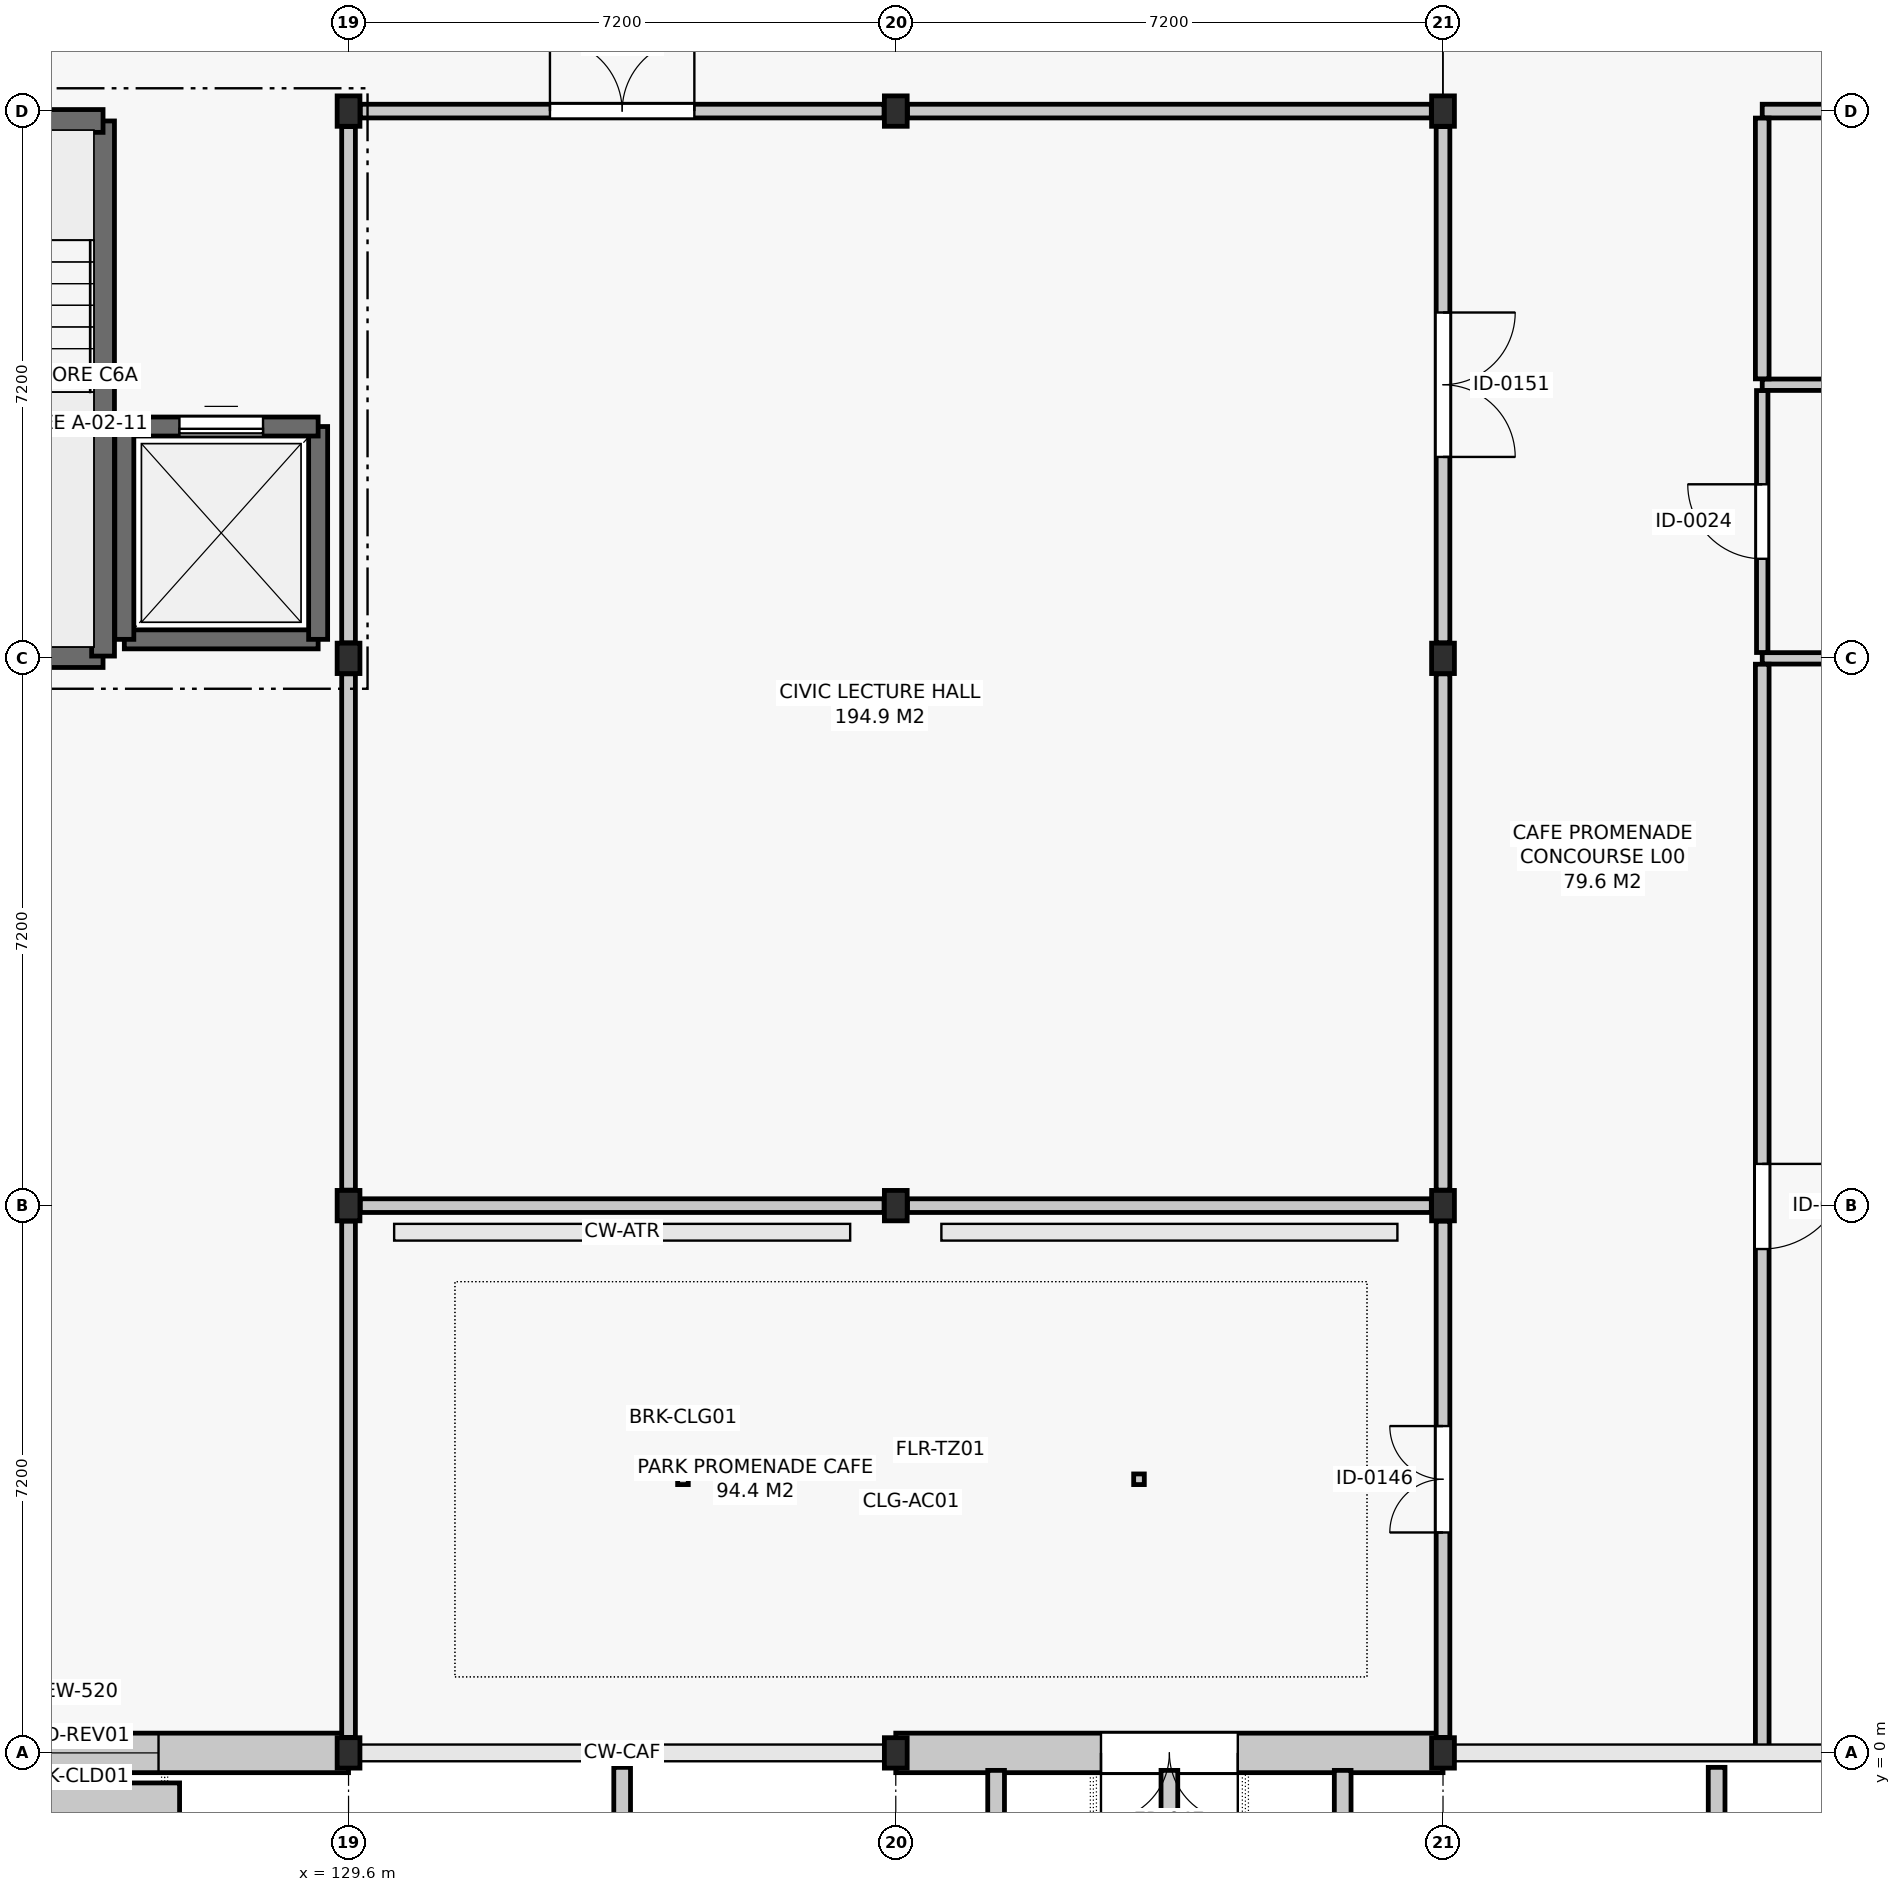
"""IFC4 building model, lengths in metres.
Left out: names, types, materials, properties, quantities, classifications, styles, units other than length and angle.
Written with IfcOpenShell. Run it as: python <this file> out.ifc"""

import sys

from ifc_helpers import new_model, si_unit, direction, frame, frame_2d, origin, origin_2d, place, context, subcontext, project, spatial, rectangle, i_section, extrude, element, fill, save


model = new_model("IFC4")
c1 = context("Model", 3, precision=1e-05, world=origin(), true_north=direction((0.0, 1.0)))
c2 = subcontext(c1, "Body", "Model", "MODEL_VIEW")
j1 = project(units=[si_unit("LENGTHUNIT", "METRE"), si_unit("PLANEANGLEUNIT", "RADIAN")], contexts=[c1])
p1 = place(None, origin())
s1 = spatial("IfcSite", under=j1, at=p1, CompositionType="ELEMENT")
p2 = place(p1, origin())
s2 = spatial("IfcBuilding", under=s1, at=p2, CompositionType="ELEMENT")
p3 = place(p2, origin())
s3 = spatial("IfcBuildingStorey", under=s2, at=p3, CompositionType="ELEMENT", Elevation=0.0)
for number, where, z_axis, x_axis in (
    (1, (129.6, 0.0, 0.0), (0.0, 0.0, 1.0), (1.0, 0.0, 0.0)),
    (2, (129.6, 7.2, 0.0), (0.0, 0.0, 1.0), (1.0, 0.0, 0.0)),
    (3, (129.6, 14.4, 0.0), (0.0, 0.0, 1.0), (1.0, 0.0, 0.0)),
    (4, (129.6, 21.6, 0.0), (0.0, 0.0, 1.0), (1.0, 0.0, 0.0)),
    (5, (136.8, 0.0, 0.0), (0.0, 0.0, 1.0), (1.0, 0.0, 0.0)),
    (6, (136.8, 7.2, 0.0), (0.0, 0.0, 1.0), (1.0, 0.0, 0.0)),
    (7, (136.8, 21.6, 0.0), (0.0, 0.0, 1.0), (1.0, 0.0, 0.0)),
    (8, (144.0, 0.0, 0.0), (0.0, 0.0, 1.0), (1.0, 0.0, 0.0)),
    (9, (144.0, 7.2, 0.0), (0.0, 0.0, 1.0), (1.0, 0.0, 0.0)),
    (10, (144.0, 14.4, 0.0), (0.0, 0.0, 1.0), (1.0, 0.0, 0.0)),
    (11, (144.0, 21.6, 0.0), (0.0, 0.0, 1.0), (1.0, 0.0, 0.0)),
):
    element("IfcColumn", number, at=place(p3, frame(where, z_axis=z_axis, x_axis=x_axis)), inside=s3, PredefinedType="COLUMN", context=c2, shape_type="SweptSolid", body=[
        extrude(i_section(OverallWidth=0.3, OverallDepth=0.4, WebThickness=0.013, FlangeThickness=0.024, FilletRadius=0.027, at=origin_2d()), origin(), (0.0, 0.0, 1.0), 5.4),
    ])
p4 = place(p3, frame((122.554, 0.0, 0.0), z_axis=(0.0, 0.0, 1.0), x_axis=(1.0, 0.0, 0.0)))
e12 = element("IfcWall", 12, at=p4, inside=s3, PredefinedType="SOLIDWALL", context=c2, shape_type="SweptSolid", body=[
    extrude(rectangle(XDim=7.046, YDim=0.52, at=frame_2d((3.523, 0.0))), origin(), (0.0, 0.0, 1.0), 4.4),
])
p5 = place(p4, frame((2.346, 0.0, 0.9)))
e13 = element("IfcOpeningElement", 13, at=p5, cuts=e12, PredefinedType="OPENING", context=c2, shape_type="SweptSolid", body=[
    extrude(rectangle(XDim=2.2, YDim=2.25, at=frame_2d((1.1, 1.125))), frame((0.0, 0.272, 0.0), z_axis=(0.0, -1.0, 0.0), x_axis=(1.0, 0.0, 0.0)), (0.0, 0.0, 1.0), 0.544),
])
p6 = place(p3, frame((136.8, 0.0, 0.0), z_axis=(0.0, 0.0, 1.0), x_axis=(1.0, 0.0, 0.0)))
e14 = element("IfcWall", 14, at=p6, inside=s3, PredefinedType="SOLIDWALL", context=c2, shape_type="SweptSolid", body=[
    extrude(rectangle(XDim=7.2, YDim=0.52, at=frame_2d((3.6, 0.0))), origin(), (0.0, 0.0, 1.0), 4.4),
])
p7 = place(p6, frame((2.7, 0.0, 0.0)))
e15 = element("IfcOpeningElement", 15, at=p7, cuts=e14, PredefinedType="OPENING", context=c2, shape_type="SweptSolid", body=[
    extrude(rectangle(XDim=1.8, YDim=2.4, at=frame_2d((0.9, 1.2))), frame((0.0, 0.272, 0.0), z_axis=(0.0, -1.0, 0.0), x_axis=(1.0, 0.0, 0.0)), (0.0, 0.0, 1.0), 0.544),
])
p8 = place(p3, frame((122.93, 14.43, 0.0), z_axis=(0.0, 0.0, 1.0), x_axis=(1.0, 0.0, 0.0)))
e16 = element("IfcWall", 16, at=p8, inside=s3, PredefinedType="SHEAR", context=c2, shape_type="SweptSolid", body=[
    extrude(rectangle(XDim=3.44, YDim=0.3, at=frame_2d((1.72, 0.0))), origin(), (0.0, 0.0, 1.0), 5.12),
])
p9 = place(p3, frame((126.37, 14.43, 0.0), z_axis=(0.0, 0.0, 1.0), x_axis=(0.0, 1.0, 0.0)))
e17 = element("IfcWall", 17, at=p9, inside=s3, PredefinedType="SHEAR", context=c2, shape_type="SweptSolid", body=[
    extrude(rectangle(XDim=7.04, YDim=0.3, at=frame_2d((3.52, 0.0))), origin(), (0.0, 0.0, 1.0), 5.12),
])
p10 = place(p3, frame((126.37, 21.47, 0.0), z_axis=(0.0, 0.0, 1.0), x_axis=(-1.0, 0.0, 0.0)))
e18 = element("IfcWall", 18, at=p10, inside=s3, PredefinedType="SHEAR", context=c2, shape_type="SweptSolid", body=[
    extrude(rectangle(XDim=3.44, YDim=0.3, at=frame_2d((1.72, 0.0))), origin(), (0.0, 0.0, 1.0), 5.12),
])
p11 = place(p10, frame((1.17, 0.0, 0.0)))
e19 = element("IfcOpeningElement", 19, at=p11, cuts=e18, PredefinedType="OPENING", context=c2, shape_type="SweptSolid", body=[
    extrude(rectangle(XDim=1.1, YDim=2.15, at=frame_2d((0.55, 1.075))), frame((0.0, 0.162, 0.0), z_axis=(0.0, -1.0, 0.0), x_axis=(1.0, 0.0, 0.0)), (0.0, 0.0, 1.0), 0.324),
])
p12 = place(p3, frame((126.65, 14.65, 0.0), z_axis=(0.0, 0.0, 1.0), x_axis=(1.0, 0.0, 0.0)))
e20 = element("IfcWall", 20, at=p12, inside=s3, PredefinedType="SHEAR", context=c2, shape_type="SweptSolid", body=[
    extrude(rectangle(XDim=2.55, YDim=0.25, at=frame_2d((1.275, 0.0))), origin(), (0.0, 0.0, 1.0), 5.12),
])
p13 = place(p3, frame((129.2, 14.65, 0.0), z_axis=(0.0, 0.0, 1.0), x_axis=(0.0, 1.0, 0.0)))
e21 = element("IfcWall", 21, at=p13, inside=s3, PredefinedType="SHEAR", context=c2, shape_type="SweptSolid", body=[
    extrude(rectangle(XDim=2.8, YDim=0.25, at=frame_2d((1.4, 0.0))), origin(), (0.0, 0.0, 1.0), 5.12),
])
p14 = place(p3, frame((129.2, 17.45, 0.0), z_axis=(0.0, 0.0, 1.0), x_axis=(-1.0, 0.0, 0.0)))
e22 = element("IfcWall", 22, at=p14, inside=s3, PredefinedType="SHEAR", context=c2, shape_type="SweptSolid", body=[
    extrude(rectangle(XDim=2.55, YDim=0.25, at=frame_2d((1.275, 0.0))), origin(), (0.0, 0.0, 1.0), 5.12),
])
p15 = place(p14, frame((0.725, 0.0, 0.0)))
e23 = element("IfcOpeningElement", 23, at=p15, cuts=e22, PredefinedType="OPENING", context=c2, shape_type="SweptSolid", body=[
    extrude(rectangle(XDim=1.1, YDim=2.1, at=frame_2d((0.55, 1.05))), frame((0.0, 0.137, 0.0), z_axis=(0.0, -1.0, 0.0), x_axis=(1.0, 0.0, 0.0)), (0.0, 0.0, 1.0), 0.274),
])
p16 = place(p3, frame((126.65, 17.45, 0.0), z_axis=(0.0, 0.0, 1.0), x_axis=(0.0, -1.0, 0.0)))
e24 = element("IfcWall", 24, at=p16, inside=s3, PredefinedType="SHEAR", context=c2, shape_type="SweptSolid", body=[
    extrude(rectangle(XDim=2.8, YDim=0.25, at=frame_2d((1.4, 0.0))), origin(), (0.0, 0.0, 1.0), 5.12),
])
p17 = place(p3, frame((148.2, 14.4, 0.0), z_axis=(0.0, 0.0, 1.0), x_axis=(1.0, 0.0, 0.0)))
e25 = element("IfcWall", 25, at=p17, inside=s3, PredefinedType="PARTITIONING", context=c2, shape_type="SweptSolid", body=[
    extrude(rectangle(XDim=2.846, YDim=0.15, at=frame_2d((1.423, 0.0))), origin(), (0.0, 0.0, 1.0), 4.715),
])
p18 = place(p3, frame((148.2, 18.0, 0.0), z_axis=(0.0, 0.0, 1.0), x_axis=(1.0, 0.0, 0.0)))
e26 = element("IfcWall", 26, at=p18, inside=s3, PredefinedType="PARTITIONING", context=c2, shape_type="SweptSolid", body=[
    extrude(rectangle(XDim=6.6, YDim=0.15, at=frame_2d((3.3, 0.0))), origin(), (0.0, 0.0, 1.0), 4.665),
])
p19 = place(p3, frame((148.2, 21.6, 0.0), z_axis=(0.0, 0.0, 1.0), x_axis=(1.0, 0.0, 0.0)))
e27 = element("IfcWall", 27, at=p19, inside=s3, PredefinedType="PARTITIONING", context=c2, shape_type="SweptSolid", body=[
    extrude(rectangle(XDim=2.846, YDim=0.18, at=frame_2d((1.423, 0.0))), origin(), (0.0, 0.0, 1.0), 4.715),
])
p20 = place(p3, frame((129.754, 7.2, 0.0), z_axis=(0.0, 0.0, 1.0), x_axis=(1.0, 0.0, 0.0)))
e28 = element("IfcWall", 28, at=p20, inside=s3, PredefinedType="PARTITIONING", context=c2, shape_type="SweptSolid", body=[
    extrude(rectangle(XDim=6.892, YDim=0.18, at=frame_2d((3.446, 0.0))), origin(), (0.0, 0.0, 1.0), 5.105),
])
p21 = place(p3, frame((136.954, 7.2, 0.0), z_axis=(0.0, 0.0, 1.0), x_axis=(1.0, 0.0, 0.0)))
e29 = element("IfcWall", 29, at=p21, inside=s3, PredefinedType="PARTITIONING", context=c2, shape_type="SweptSolid", body=[
    extrude(rectangle(XDim=6.892, YDim=0.18, at=frame_2d((3.446, 0.0))), origin(), (0.0, 0.0, 1.0), 5.105),
])
p22 = place(p3, frame((129.754, 21.6, 0.0), z_axis=(0.0, 0.0, 1.0), x_axis=(1.0, 0.0, 0.0)))
e30 = element("IfcWall", 30, at=p22, inside=s3, PredefinedType="PARTITIONING", context=c2, shape_type="SweptSolid", body=[
    extrude(rectangle(XDim=6.892, YDim=0.18, at=frame_2d((3.446, 0.0))), origin(), (0.0, 0.0, 1.0), 5.105),
])
p23 = place(p22, frame((2.496, 0.0, 0.0)))
e31 = element("IfcOpeningElement", 31, at=p23, cuts=e30, PredefinedType="OPENING", context=c2, shape_type="SweptSolid", body=[
    extrude(rectangle(XDim=1.9, YDim=2.35, at=frame_2d((0.95, 1.175))), frame((0.0, 0.102, 0.0), z_axis=(0.0, -1.0, 0.0), x_axis=(1.0, 0.0, 0.0)), (0.0, 0.0, 1.0), 0.204),
])
p24 = place(p3, frame((136.954, 21.6, 0.0), z_axis=(0.0, 0.0, 1.0), x_axis=(1.0, 0.0, 0.0)))
e32 = element("IfcWall", 32, at=p24, inside=s3, PredefinedType="PARTITIONING", context=c2, shape_type="SweptSolid", body=[
    extrude(rectangle(XDim=6.892, YDim=0.18, at=frame_2d((3.446, 0.0))), origin(), (0.0, 0.0, 1.0), 5.105),
])
p25 = place(p3, frame((148.2, 14.477, 0.0), z_axis=(0.0, 0.0, 1.0), x_axis=(0.0, 1.0, 0.0)))
e33 = element("IfcWall", 33, at=p25, inside=s3, PredefinedType="PARTITIONING", context=c2, shape_type="SweptSolid", body=[
    extrude(rectangle(XDim=3.446, YDim=0.15, at=frame_2d((1.723, 0.0))), origin(), (0.0, 0.0, 1.0), 4.715),
])
p26 = place(p25, frame((1.233, 0.0, 0.0)))
e34 = element("IfcOpeningElement", 34, at=p26, cuts=e33, PredefinedType="OPENING", context=c2, shape_type="SweptSolid", body=[
    extrude(rectangle(XDim=0.98, YDim=2.1, at=frame_2d((0.49, 1.05))), frame((0.0, 0.087, 0.0), z_axis=(0.0, -1.0, 0.0), x_axis=(1.0, 0.0, 0.0)), (0.0, 0.0, 1.0), 0.174),
])
p27 = place(p3, frame((148.2, 18.077, 0.0), z_axis=(0.0, 0.0, 1.0), x_axis=(0.0, 1.0, 0.0)))
e35 = element("IfcWall", 35, at=p27, inside=s3, PredefinedType="PARTITIONING", context=c2, shape_type="SweptSolid", body=[
    extrude(rectangle(XDim=3.431, YDim=0.18, at=frame_2d((1.716, 0.0))), origin(), (0.0, 0.0, 1.0), 4.715),
])
p28 = place(p3, frame((129.6, 0.204, 0.0), z_axis=(0.0, 0.0, 1.0), x_axis=(0.0, 1.0, 0.0)))
e36 = element("IfcWall", 36, at=p28, inside=s3, PredefinedType="PARTITIONING", context=c2, shape_type="SweptSolid", body=[
    extrude(rectangle(XDim=6.792, YDim=0.18, at=frame_2d((3.396, 0.0))), origin(), (0.0, 0.0, 1.0), 4.665),
])
p29 = place(p3, frame((144.0, 0.204, 0.0), z_axis=(0.0, 0.0, 1.0), x_axis=(0.0, 1.0, 0.0)))
e37 = element("IfcWall", 37, at=p29, inside=s3, PredefinedType="PARTITIONING", context=c2, shape_type="SweptSolid", body=[
    extrude(rectangle(XDim=6.792, YDim=0.18, at=frame_2d((3.396, 0.0))), origin(), (0.0, 0.0, 1.0), 4.665),
])
p30 = place(p29, frame((2.696, 0.0, 0.0)))
e38 = element("IfcOpeningElement", 38, at=p30, cuts=e37, PredefinedType="OPENING", context=c2, shape_type="SweptSolid", body=[
    extrude(rectangle(XDim=1.4, YDim=2.2, at=frame_2d((0.7, 1.1))), frame((0.0, 0.102, 0.0), z_axis=(0.0, -1.0, 0.0), x_axis=(1.0, 0.0, 0.0)), (0.0, 0.0, 1.0), 0.204),
])
p31 = place(p3, frame((148.2, 0.055, 0.0), z_axis=(0.0, 0.0, 1.0), x_axis=(0.0, 1.0, 0.0)))
e39 = element("IfcWall", 39, at=p31, inside=s3, PredefinedType="PARTITIONING", context=c2, shape_type="SweptSolid", body=[
    extrude(rectangle(XDim=14.268, YDim=0.18, at=frame_2d((7.134, 0.0))), origin(), (0.0, 0.0, 1.0), 4.555),
])
p32 = place(p31, frame((6.574, 0.0, 0.0)))
e40 = element("IfcOpeningElement", 40, at=p32, cuts=e39, PredefinedType="OPENING", context=c2, shape_type="SweptSolid", body=[
    extrude(rectangle(XDim=1.12, YDim=2.15, at=frame_2d((0.56, 1.075))), frame((0.0, 0.102, 0.0), z_axis=(0.0, -1.0, 0.0), x_axis=(1.0, 0.0, 0.0)), (0.0, 0.0, 1.0), 0.204),
])
for number, where, z_axis, x_axis in (
    (41, (129.6, 7.404, 0.0), (0.0, 0.0, 1.0), (0.0, 1.0, 0.0)),
    (42, (129.6, 14.604, 0.0), (0.0, 0.0, 1.0), (0.0, 1.0, 0.0)),
    (43, (144.0, 7.404, 0.0), (0.0, 0.0, 1.0), (0.0, 1.0, 0.0)),
):
    element("IfcWall", number, at=place(p3, frame(where, z_axis=z_axis, x_axis=x_axis)), inside=s3, PredefinedType="PARTITIONING", context=c2, shape_type="SweptSolid", body=[
        extrude(rectangle(XDim=6.792, YDim=0.18, at=frame_2d((3.396, 0.0))), origin(), (0.0, 0.0, 1.0), 5.105),
    ])
p33 = place(p3, frame((144.0, 14.604, 0.0), z_axis=(0.0, 0.0, 1.0), x_axis=(0.0, 1.0, 0.0)))
e44 = element("IfcWall", 44, at=p33, inside=s3, PredefinedType="PARTITIONING", context=c2, shape_type="SweptSolid", body=[
    extrude(rectangle(XDim=6.792, YDim=0.18, at=frame_2d((3.396, 0.0))), origin(), (0.0, 0.0, 1.0), 5.105),
])
p34 = place(p33, frame((2.446, 0.0, 0.0)))
e45 = element("IfcOpeningElement", 45, at=p34, cuts=e44, PredefinedType="OPENING", context=c2, shape_type="SweptSolid", body=[
    extrude(rectangle(XDim=1.9, YDim=2.35, at=frame_2d((0.95, 1.175))), frame((0.0, 0.102, 0.0), z_axis=(0.0, -1.0, 0.0), x_axis=(1.0, 0.0, 0.0)), (0.0, 0.0, 1.0), 0.204),
])
p35 = place(p5, origin())
e46 = element("IfcWindow", 46, at=p35, inside=s3, PartitioningType="SINGLE_PANEL", PredefinedType="WINDOW", context=c2, shape_type="SweptSolid", body=[
    extrude(rectangle(XDim=2.2, YDim=2.25, at=frame_2d((1.1, 1.125))), frame((0.0, 0.03, 0.0), z_axis=(0.0, -1.0, 0.0), x_axis=(1.0, 0.0, 0.0)), (0.0, 0.0, 1.0), 0.06),
])
fill(e13, e46)
p36 = place(p7, frame((1.8, 0.0, 0.0), z_axis=(0.0, 0.0, 1.0), x_axis=(-1.0, 0.0, 0.0)))
e47 = element("IfcDoor", 47, at=p36, inside=s3, OperationType="DOUBLE_DOOR_SINGLE_SWING", PredefinedType="DOOR", context=c2, shape_type="SweptSolid", body=[
    extrude(rectangle(XDim=1.8, YDim=2.4, at=frame_2d((0.9, 1.2))), frame((0.0, 0.025, 0.0), z_axis=(0.0, -1.0, 0.0), x_axis=(1.0, 0.0, 0.0)), (0.0, 0.0, 1.0), 0.05),
])
fill(e15, e47)
p37 = place(p15, origin())
e48 = element("IfcDoor", 48, at=p37, inside=s3, OperationType="SLIDING_TO_LEFT", PredefinedType="DOOR", context=c2, shape_type="SweptSolid", body=[
    extrude(rectangle(XDim=1.1, YDim=2.1, at=frame_2d((0.55, 1.05))), frame((0.0, 0.025, 0.0), z_axis=(0.0, -1.0, 0.0), x_axis=(1.0, 0.0, 0.0)), (0.0, 0.0, 1.0), 0.05),
])
fill(e23, e48)
p38 = place(p26, origin())
e49 = element("IfcDoor", 49, at=p38, inside=s3, OperationType="SINGLE_SWING_RIGHT", PredefinedType="DOOR", context=c2, shape_type="SweptSolid", body=[
    extrude(rectangle(XDim=0.98, YDim=2.1, at=frame_2d((0.49, 1.05))), frame((0.0, 0.025, 0.0), z_axis=(0.0, -1.0, 0.0), x_axis=(1.0, 0.0, 0.0)), (0.0, 0.0, 1.0), 0.05),
])
fill(e34, e49)
p39 = place(p30, origin())
e50 = element("IfcDoor", 50, at=p39, inside=s3, OperationType="DOUBLE_DOOR_SINGLE_SWING", PredefinedType="DOOR", context=c2, shape_type="SweptSolid", body=[
    extrude(rectangle(XDim=1.4, YDim=2.2, at=frame_2d((0.7, 1.1))), frame((0.0, 0.025, 0.0), z_axis=(0.0, -1.0, 0.0), x_axis=(1.0, 0.0, 0.0)), (0.0, 0.0, 1.0), 0.05),
])
fill(e38, e50)
p40 = place(p32, frame((1.12, 0.0, 0.0), z_axis=(0.0, 0.0, 1.0), x_axis=(-1.0, 0.0, 0.0)))
e51 = element("IfcDoor", 51, at=p40, inside=s3, OperationType="SINGLE_SWING_LEFT", PredefinedType="DOOR", context=c2, shape_type="SweptSolid", body=[
    extrude(rectangle(XDim=1.12, YDim=2.15, at=frame_2d((0.56, 1.075))), frame((0.0, 0.025, 0.0), z_axis=(0.0, -1.0, 0.0), x_axis=(1.0, 0.0, 0.0)), (0.0, 0.0, 1.0), 0.05),
])
fill(e40, e51)
p41 = place(p23, origin())
e52 = element("IfcDoor", 52, at=p41, inside=s3, OperationType="DOUBLE_DOOR_SINGLE_SWING", PredefinedType="DOOR", context=c2, shape_type="SweptSolid", body=[
    extrude(rectangle(XDim=1.9, YDim=2.35, at=frame_2d((0.95, 1.175))), frame((0.0, 0.025, 0.0), z_axis=(0.0, -1.0, 0.0), x_axis=(1.0, 0.0, 0.0)), (0.0, 0.0, 1.0), 0.05),
])
fill(e31, e52)
p42 = place(p34, frame((1.9, 0.0, 0.0), z_axis=(0.0, 0.0, 1.0), x_axis=(-1.0, 0.0, 0.0)))
e53 = element("IfcDoor", 53, at=p42, inside=s3, OperationType="DOUBLE_DOOR_SINGLE_SWING", PredefinedType="DOOR", context=c2, shape_type="SweptSolid", body=[
    extrude(rectangle(XDim=1.9, YDim=2.35, at=frame_2d((0.95, 1.175))), frame((0.0, 0.025, 0.0), z_axis=(0.0, -1.0, 0.0), x_axis=(1.0, 0.0, 0.0)), (0.0, 0.0, 1.0), 0.05),
])
fill(e45, e53)
save(model, sys.argv[1])
